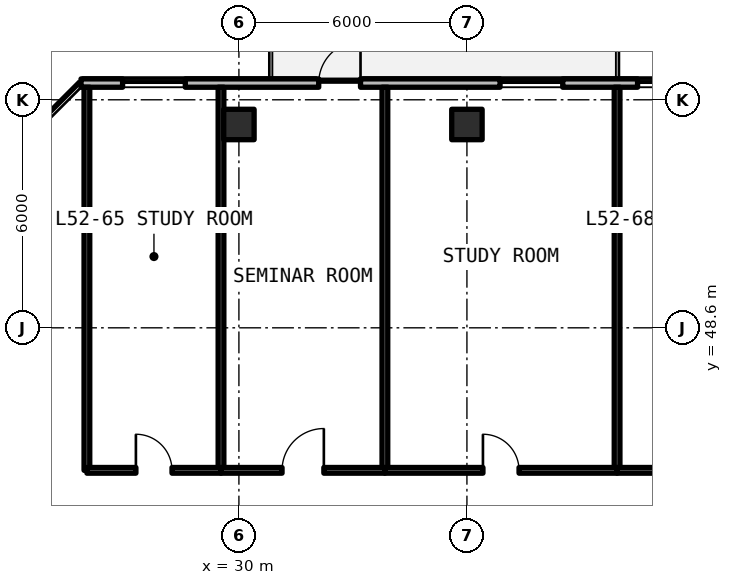
"""IFC4 building model, lengths in metres.
Left out: names, types, materials, properties, quantities, classifications, styles, units other than length and angle.
Written with IfcOpenShell. Run it as: python <this file> out.ifc"""

import sys

from ifc_helpers import new_model, si_unit, direction, frame, frame_2d, origin, origin_2d, place, context, subcontext, project, spatial, rectangle, extrude, element, fill, save


model = new_model("IFC4")
c1 = context("Model", 3, precision=1e-05, world=origin(), true_north=direction((0.0, 1.0)))
c2 = subcontext(c1, "Body", "Model", "MODEL_VIEW")
j1 = project(units=[si_unit("LENGTHUNIT", "METRE"), si_unit("PLANEANGLEUNIT", "RADIAN")], contexts=[c1])
p1 = place(None, origin())
s1 = spatial("IfcSite", under=j1, at=p1, CompositionType="ELEMENT")
p2 = place(p1, origin())
s2 = spatial("IfcBuilding", under=s1, at=p2, CompositionType="ELEMENT")
p3 = place(p2, frame((0.0, 0.0, 188.43)))
s3 = spatial("IfcBuildingStorey", under=s2, at=p3, CompositionType="ELEMENT", Elevation=188.43)
for number, where, z_axis, x_axis in (
    (1, (30.0, 53.95, 0.0), (0.0, 0.0, 1.0), (1.0, 0.0, 0.0)),
    (2, (36.0, 53.95, 0.0), (0.0, 0.0, 1.0), (1.0, 0.0, 0.0)),
):
    element("IfcColumn", number, at=place(p3, frame(where, z_axis=z_axis, x_axis=x_axis)), inside=s3, PredefinedType="COLUMN", context=c2, shape_type="SweptSolid", body=[
        extrude(rectangle(XDim=0.8, YDim=0.8, at=origin_2d()), origin(), (0.0, 0.0, 1.0), 3.3),
    ])
p4 = place(p3, frame((43.49, 55.04, 0.0), z_axis=(0.0, 0.0, 1.0), x_axis=(-1.0, 0.0, 0.0)))
e3 = element("IfcWall", 3, at=p4, inside=s3, PredefinedType="SOLIDWALL", context=c2, shape_type="SweptSolid", body=[
    extrude(rectangle(XDim=17.644, YDim=0.22, at=frame_2d((8.822, 0.0))), origin(), (0.0, 0.0, 1.0), 3.08),
])
p5 = place(p4, frame((10.29, 0.0, 0.0)))
e4 = element("IfcOpeningElement", 4, at=p5, cuts=e3, PredefinedType="OPENING", context=c2, shape_type="SweptSolid", body=[
    extrude(rectangle(XDim=1.1, YDim=2.15, at=frame_2d((0.55, 1.075))), frame((0.0, 0.12, 0.0), z_axis=(0.0, -1.0, 0.0), x_axis=(1.0, 0.0, 0.0)), (0.0, 0.0, 1.0), 0.24),
])
p6 = place(p4, frame((14.901, 0.0, 0.78)))
e5 = element("IfcOpeningElement", 5, at=p6, cuts=e3, PredefinedType="OPENING", context=c2, shape_type="SweptSolid", body=[
    extrude(rectangle(XDim=1.65, YDim=1.66, at=frame_2d((0.825, 0.83))), frame((0.0, 0.12, 0.0), z_axis=(0.0, -1.0, 0.0), x_axis=(1.0, 0.0, 0.0)), (0.0, 0.0, 1.0), 0.24),
])
p7 = place(p4, frame((4.969, 0.0, 0.78)))
e6 = element("IfcOpeningElement", 6, at=p7, cuts=e3, PredefinedType="OPENING", context=c2, shape_type="SweptSolid", body=[
    extrude(rectangle(XDim=1.65, YDim=1.66, at=frame_2d((0.825, 0.83))), frame((0.0, 0.12, 0.0), z_axis=(0.0, -1.0, 0.0), x_axis=(1.0, 0.0, 0.0)), (0.0, 0.0, 1.0), 0.24),
])
p8 = place(p4, frame((2.149, 0.0, 0.78)))
e7 = element("IfcOpeningElement", 7, at=p8, cuts=e3, PredefinedType="OPENING", context=c2, shape_type="SweptSolid", body=[
    extrude(rectangle(XDim=0.85, YDim=1.65, at=frame_2d((0.425, 0.825))), frame((0.0, 0.12, 0.0), z_axis=(0.0, -1.0, 0.0), x_axis=(1.0, 0.0, 0.0)), (0.0, 0.0, 1.0), 0.24),
])
for number, where, z_axis, x_axis in (
    (8, (26.0, 44.85, 0.0), (0.0, 0.0, 1.0), (0.0, 1.0, 0.0)),
    (9, (29.529, 44.85, 0.0), (0.0, 0.0, 1.0), (0.0, 1.0, 0.0)),
):
    element("IfcWall", number, at=place(p3, frame(where, z_axis=z_axis, x_axis=x_axis)), inside=s3, PredefinedType="SOLIDWALL", context=c2, shape_type="SweptSolid", body=[
        extrude(rectangle(XDim=10.08, YDim=0.15, at=frame_2d((5.04, 0.0))), origin(), (0.0, 0.0, 1.0), 2.35),
    ])
p9 = place(p3, frame((26.0, 44.85, 0.0), z_axis=(0.0, 0.0, 1.0), x_axis=(1.0, 0.0, 0.0)))
e10 = element("IfcWall", 10, at=p9, inside=s3, PredefinedType="SOLIDWALL", context=c2, shape_type="SweptSolid", body=[
    extrude(rectangle(XDim=3.529, YDim=0.15, at=frame_2d((1.764, 0.0))), origin(), (0.0, 0.0, 1.0), 2.35),
])
p10 = place(p9, frame((1.289, 0.0, 0.0)))
e11 = element("IfcOpeningElement", 11, at=p10, cuts=e10, PredefinedType="OPENING", context=c2, shape_type="SweptSolid", body=[
    extrude(rectangle(XDim=0.95, YDim=2.15, at=frame_2d((0.475, 1.075))), frame((0.0, 0.085, 0.0), z_axis=(0.0, -1.0, 0.0), x_axis=(1.0, 0.0, 0.0)), (0.0, 0.0, 1.0), 0.17),
])
p11 = place(p3, frame((33.842, 44.85, 0.0), z_axis=(0.0, 0.0, 1.0), x_axis=(0.0, 1.0, 0.0)))
e12 = element("IfcWall", 12, at=p11, inside=s3, PredefinedType="SOLIDWALL", context=c2, shape_type="SweptSolid", body=[
    extrude(rectangle(XDim=10.08, YDim=0.15, at=frame_2d((5.04, 0.0))), origin(), (0.0, 0.0, 1.0), 2.35),
])
p12 = place(p3, frame((29.529, 44.85, 0.0), z_axis=(0.0, 0.0, 1.0), x_axis=(1.0, 0.0, 0.0)))
e13 = element("IfcWall", 13, at=p12, inside=s3, PredefinedType="SOLIDWALL", context=c2, shape_type="SweptSolid", body=[
    extrude(rectangle(XDim=4.313, YDim=0.15, at=frame_2d((2.156, 0.0))), origin(), (0.0, 0.0, 1.0), 2.35),
])
p13 = place(p12, frame((1.606, 0.0, 0.0)))
e14 = element("IfcOpeningElement", 14, at=p13, cuts=e13, PredefinedType="OPENING", context=c2, shape_type="SweptSolid", body=[
    extrude(rectangle(XDim=1.1, YDim=2.15, at=frame_2d((0.55, 1.075))), frame((0.0, 0.085, 0.0), z_axis=(0.0, -1.0, 0.0), x_axis=(1.0, 0.0, 0.0)), (0.0, 0.0, 1.0), 0.17),
])
p14 = place(p3, frame((39.951, 44.85, 0.0), z_axis=(0.0, 0.0, 1.0), x_axis=(0.0, 1.0, 0.0)))
e15 = element("IfcWall", 15, at=p14, inside=s3, PredefinedType="SOLIDWALL", context=c2, shape_type="SweptSolid", body=[
    extrude(rectangle(XDim=10.08, YDim=0.15, at=frame_2d((5.04, 0.0))), origin(), (0.0, 0.0, 1.0), 2.35),
])
p15 = place(p3, frame((33.842, 44.85, 0.0), z_axis=(0.0, 0.0, 1.0), x_axis=(1.0, 0.0, 0.0)))
e16 = element("IfcWall", 16, at=p15, inside=s3, PredefinedType="SOLIDWALL", context=c2, shape_type="SweptSolid", body=[
    extrude(rectangle(XDim=6.11, YDim=0.15, at=frame_2d((3.055, 0.0))), origin(), (0.0, 0.0, 1.0), 2.35),
])
p16 = place(p15, frame((2.58, 0.0, 0.0)))
e17 = element("IfcOpeningElement", 17, at=p16, cuts=e16, PredefinedType="OPENING", context=c2, shape_type="SweptSolid", body=[
    extrude(rectangle(XDim=0.95, YDim=2.15, at=frame_2d((0.475, 1.075))), frame((0.0, 0.085, 0.0), z_axis=(0.0, -1.0, 0.0), x_axis=(1.0, 0.0, 0.0)), (0.0, 0.0, 1.0), 0.17),
])
p17 = place(p3, frame((39.951, 44.85, 0.0), z_axis=(0.0, 0.0, 1.0), x_axis=(1.0, 0.0, 0.0)))
e18 = element("IfcWall", 18, at=p17, inside=s3, PredefinedType="SOLIDWALL", context=c2, shape_type="SweptSolid", body=[
    extrude(rectangle(XDim=3.529, YDim=0.15, at=frame_2d((1.764, 0.0))), origin(), (0.0, 0.0, 1.0), 2.35),
])
p18 = place(p17, frame((1.289, 0.0, 0.0)))
e19 = element("IfcOpeningElement", 19, at=p18, cuts=e18, PredefinedType="OPENING", context=c2, shape_type="SweptSolid", body=[
    extrude(rectangle(XDim=0.95, YDim=2.15, at=frame_2d((0.475, 1.075))), frame((0.0, 0.085, 0.0), z_axis=(0.0, -1.0, 0.0), x_axis=(1.0, 0.0, 0.0)), (0.0, 0.0, 1.0), 0.17),
])
p19 = place(p5, frame((1.1, 0.0, 0.0), z_axis=(0.0, 0.0, 1.0), x_axis=(-1.0, 0.0, 0.0)))
e20 = element("IfcDoor", 20, at=p19, inside=s3, OperationType="SINGLE_SWING_LEFT", PredefinedType="DOOR", context=c2, shape_type="SweptSolid", body=[
    extrude(rectangle(XDim=1.1, YDim=2.15, at=frame_2d((0.55, 1.075))), frame((0.0, 0.025, 0.0), z_axis=(0.0, -1.0, 0.0), x_axis=(1.0, 0.0, 0.0)), (0.0, 0.0, 1.0), 0.05),
])
fill(e4, e20)
p20 = place(p6, origin())
e21 = element("IfcWindow", 21, at=p20, inside=s3, PartitioningType="SINGLE_PANEL", PredefinedType="WINDOW", context=c2, shape_type="SweptSolid", body=[
    extrude(rectangle(XDim=1.65, YDim=1.66, at=frame_2d((0.825, 0.83))), frame((0.0, 0.03, 0.0), z_axis=(0.0, -1.0, 0.0), x_axis=(1.0, 0.0, 0.0)), (0.0, 0.0, 1.0), 0.06),
])
fill(e5, e21)
p21 = place(p7, origin())
e22 = element("IfcWindow", 22, at=p21, inside=s3, PartitioningType="SINGLE_PANEL", PredefinedType="WINDOW", context=c2, shape_type="SweptSolid", body=[
    extrude(rectangle(XDim=1.65, YDim=1.66, at=frame_2d((0.825, 0.83))), frame((0.0, 0.03, 0.0), z_axis=(0.0, -1.0, 0.0), x_axis=(1.0, 0.0, 0.0)), (0.0, 0.0, 1.0), 0.06),
])
fill(e6, e22)
p22 = place(p8, origin())
e23 = element("IfcWindow", 23, at=p22, inside=s3, PartitioningType="SINGLE_PANEL", PredefinedType="WINDOW", context=c2, shape_type="SweptSolid", body=[
    extrude(rectangle(XDim=0.85, YDim=1.65, at=frame_2d((0.425, 0.825))), frame((0.0, 0.03, 0.0), z_axis=(0.0, -1.0, 0.0), x_axis=(1.0, 0.0, 0.0)), (0.0, 0.0, 1.0), 0.06),
])
fill(e7, e23)
p23 = place(p10, origin())
e24 = element("IfcDoor", 24, at=p23, inside=s3, OperationType="SINGLE_SWING_LEFT", PredefinedType="DOOR", context=c2, shape_type="SweptSolid", body=[
    extrude(rectangle(XDim=0.95, YDim=2.15, at=frame_2d((0.475, 1.075))), frame((0.0, 0.025, 0.0), z_axis=(0.0, -1.0, 0.0), x_axis=(1.0, 0.0, 0.0)), (0.0, 0.0, 1.0), 0.05),
])
fill(e11, e24)
p24 = place(p13, origin())
e25 = element("IfcDoor", 25, at=p24, inside=s3, OperationType="SINGLE_SWING_RIGHT", PredefinedType="DOOR", context=c2, shape_type="SweptSolid", body=[
    extrude(rectangle(XDim=1.1, YDim=2.15, at=frame_2d((0.55, 1.075))), frame((0.0, 0.025, 0.0), z_axis=(0.0, -1.0, 0.0), x_axis=(1.0, 0.0, 0.0)), (0.0, 0.0, 1.0), 0.05),
])
fill(e14, e25)
p25 = place(p16, origin())
e26 = element("IfcDoor", 26, at=p25, inside=s3, OperationType="SINGLE_SWING_LEFT", PredefinedType="DOOR", context=c2, shape_type="SweptSolid", body=[
    extrude(rectangle(XDim=0.95, YDim=2.15, at=frame_2d((0.475, 1.075))), frame((0.0, 0.025, 0.0), z_axis=(0.0, -1.0, 0.0), x_axis=(1.0, 0.0, 0.0)), (0.0, 0.0, 1.0), 0.05),
])
fill(e17, e26)
save(model, sys.argv[1])
